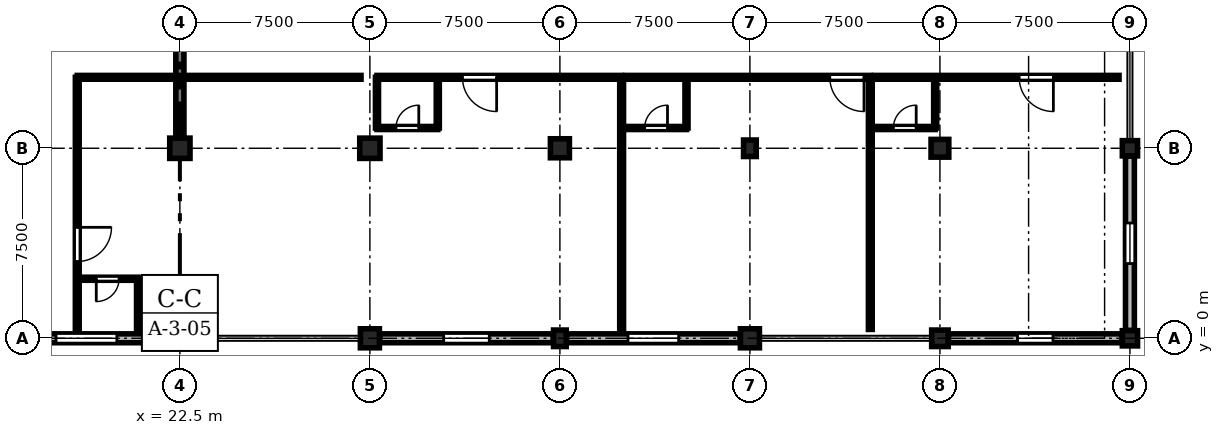
"""IFC4 building model, lengths in metres.
Left out: names, types, materials, properties, quantities, classifications, styles, units other than length and angle.
Written with IfcOpenShell. Run it as: python <this file> out.ifc"""

import sys

from ifc_helpers import new_model, si_unit, direction, frame, frame_2d, origin, origin_2d, place, context, subcontext, project, spatial, rectangle, circle, extrude, element, fill, save


model = new_model("IFC4")
c1 = context("Model", 3, precision=1e-05, world=origin(), true_north=direction((0.0, 1.0)))
c2 = subcontext(c1, "Body", "Model", "MODEL_VIEW")
j1 = project(units=[si_unit("LENGTHUNIT", "METRE"), si_unit("PLANEANGLEUNIT", "RADIAN")], contexts=[c1])
p1 = place(None, origin())
s1 = spatial("IfcSite", under=j1, at=p1, CompositionType="ELEMENT")
p2 = place(p1, origin())
s2 = spatial("IfcBuilding", under=s1, at=p2, CompositionType="ELEMENT")
p3 = place(p2, frame((0.0, 0.0, 9.3)))
s3 = spatial("IfcBuildingStorey", under=s2, at=p3, CompositionType="ELEMENT", Elevation=9.3)
p4 = place(p3, frame((22.5, 0.0, 0.0), z_axis=(0.0, 0.0, 1.0), x_axis=(1.0, 0.0, 0.0)))
e1 = element("IfcColumn", 1, at=p4, inside=s3, PredefinedType="COLUMN", context=c2, shape_type="SweptSolid", body=[
    extrude(rectangle(XDim=0.5, YDim=0.65, at=origin_2d()), origin(), (0.0, 0.0, 1.0), 4.8),
])
p5 = place(p3, frame((22.5, 7.5, 0.0), z_axis=(0.0, 0.0, 1.0), x_axis=(1.0, 0.0, 0.0)))
e2 = element("IfcColumn", 2, at=p5, inside=s3, PredefinedType="COLUMN", context=c2, shape_type="SweptSolid", body=[
    extrude(rectangle(XDim=0.8, YDim=0.8, at=origin_2d()), origin(), (0.0, 0.0, 1.0), 4.8),
])
p6 = place(p3, frame((30.0, 0.0, 0.0), z_axis=(0.0, 0.0, 1.0), x_axis=(1.0, 0.0, 0.0)))
e3 = element("IfcColumn", 3, at=p6, inside=s3, PredefinedType="COLUMN", context=c2, shape_type="SweptSolid", body=[
    extrude(rectangle(XDim=0.75, YDim=0.75, at=origin_2d()), origin(), (0.0, 0.0, 1.0), 4.8),
])
p7 = place(p3, frame((30.0, 7.5, 0.0), z_axis=(0.0, 0.0, 1.0), x_axis=(1.0, 0.0, 0.0)))
e4 = element("IfcColumn", 4, at=p7, inside=s3, PredefinedType="COLUMN", context=c2, shape_type="SweptSolid", body=[
    extrude(rectangle(XDim=0.8, YDim=0.8, at=origin_2d()), origin(), (0.0, 0.0, 1.0), 4.8),
])
p8 = place(p3, frame((37.5, 0.0, 0.0), z_axis=(0.0, 0.0, 1.0), x_axis=(1.0, 0.0, 0.0)))
e5 = element("IfcColumn", 5, at=p8, inside=s3, PredefinedType="COLUMN", context=c2, shape_type="SweptSolid", body=[
    extrude(rectangle(XDim=0.5, YDim=0.65, at=origin_2d()), origin(), (0.0, 0.0, 1.0), 4.8),
])
for number, where, z_axis, x_axis in (
    (6, (37.5, 7.5, 0.0), (0.0, 0.0, 1.0), (1.0, 0.0, 0.0)),
    (7, (45.0, 0.0, 0.0), (0.0, 0.0, 1.0), (1.0, 0.0, 0.0)),
):
    element("IfcColumn", number, at=place(p3, frame(where, z_axis=z_axis, x_axis=x_axis)), inside=s3, PredefinedType="COLUMN", context=c2, shape_type="SweptSolid", body=[
        extrude(rectangle(XDim=0.75, YDim=0.75, at=origin_2d()), origin(), (0.0, 0.0, 1.0), 4.8),
    ])
p9 = place(p3, frame((45.0, 7.5, 0.0), z_axis=(0.0, 0.0, 1.0), x_axis=(1.0, 0.0, 0.0)))
e8 = element("IfcColumn", 8, at=p9, inside=s3, PredefinedType="COLUMN", context=c2, shape_type="SweptSolid", body=[
    extrude(rectangle(XDim=0.5, YDim=0.65, at=origin_2d()), origin(), (0.0, 0.0, 1.0), 4.8),
])
p10 = place(p3, frame((52.5, 0.0, 0.0), z_axis=(0.0, 0.0, 1.0), x_axis=(1.0, 0.0, 0.0)))
e9 = element("IfcColumn", 9, at=p10, inside=s3, PredefinedType="COLUMN", context=c2, shape_type="SweptSolid", body=[
    extrude(rectangle(XDim=0.65, YDim=0.65, at=origin_2d()), origin(), (0.0, 0.0, 1.0), 4.8),
])
p11 = place(p3, frame((52.5, 7.5, 0.0), z_axis=(0.0, 0.0, 1.0), x_axis=(1.0, 0.0, 0.0)))
e10 = element("IfcColumn", 10, at=p11, inside=s3, PredefinedType="COLUMN", context=c2, shape_type="SweptSolid", body=[
    extrude(rectangle(XDim=0.7, YDim=0.7, at=origin_2d()), origin(), (0.0, 0.0, 1.0), 4.8),
])
p12 = place(p3, frame((60.0, 0.0, 0.0), z_axis=(0.0, 0.0, 1.0), x_axis=(1.0, 0.0, 0.0)))
e11 = element("IfcColumn", 11, at=p12, inside=s3, PredefinedType="COLUMN", context=c2, shape_type="SweptSolid", body=[
    extrude(rectangle(XDim=0.6, YDim=0.6, at=origin_2d()), origin(), (0.0, 0.0, 1.0), 4.8),
])
p13 = place(p3, frame((60.0, 7.5, 0.0), z_axis=(0.0, 0.0, 1.0), x_axis=(1.0, 0.0, 0.0)))
e12 = element("IfcColumn", 12, at=p13, inside=s3, PredefinedType="COLUMN", context=c2, shape_type="SweptSolid", body=[
    extrude(circle(Radius=0.3, at=origin_2d()), origin(), (0.0, 0.0, 1.0), 4.8),
])
p14 = place(p3, frame((22.5, 7.95, 0.0), z_axis=(0.0, 0.0, 1.0), x_axis=(0.0, 1.0, 0.0)))
e13 = element("IfcWall", 13, at=p14, inside=s3, PredefinedType="SHEAR", context=c2, shape_type="SweptSolid", body=[
    extrude(rectangle(XDim=6.6, YDim=0.32, at=frame_2d((3.3, 0.0))), origin(), (0.0, 0.0, 1.0), 4.0),
])
p15 = place(p3, frame((22.24, 0.0, 0.0), z_axis=(0.0, 0.0, 1.0), x_axis=(-1.0, 0.0, 0.0)))
e14 = element("IfcWall", 14, at=p15, inside=s3, PredefinedType="STANDARD", context=c2, shape_type="SweptSolid", body=[
    extrude(rectangle(XDim=6.855, YDim=0.35, at=frame_2d((3.427, 0.0))), origin(), (0.0, 0.0, 1.0), 3.95),
])
p16 = place(p15, frame((2.228, 0.0, 0.9)))
e15 = element("IfcOpeningElement", 15, at=p16, cuts=e14, PredefinedType="OPENING", context=c2, shape_type="SweptSolid", body=[
    extrude(rectangle(XDim=2.4, YDim=2.1, at=frame_2d((1.2, 1.05))), frame((0.0, 0.185, 0.0), z_axis=(0.0, -1.0, 0.0), x_axis=(1.0, 0.0, 0.0)), (0.0, 0.0, 1.0), 0.37),
])
p17 = place(p3, frame((37.24, 0.0, 0.0), z_axis=(0.0, 0.0, 1.0), x_axis=(-1.0, 0.0, 0.0)))
e16 = element("IfcWall", 16, at=p17, inside=s3, PredefinedType="STANDARD", context=c2, shape_type="SweptSolid", body=[
    extrude(rectangle(XDim=6.855, YDim=0.35, at=frame_2d((3.427, 0.0))), origin(), (0.0, 0.0, 1.0), 3.95),
])
p18 = place(p17, frame((2.528, 0.0, 0.9)))
e17 = element("IfcOpeningElement", 17, at=p18, cuts=e16, PredefinedType="OPENING", context=c2, shape_type="SweptSolid", body=[
    extrude(rectangle(XDim=1.8, YDim=1.95, at=frame_2d((0.9, 0.975))), frame((0.0, 0.185, 0.0), z_axis=(0.0, -1.0, 0.0), x_axis=(1.0, 0.0, 0.0)), (0.0, 0.0, 1.0), 0.37),
])
p19 = place(p3, frame((44.615, 0.0, 0.0), z_axis=(0.0, 0.0, 1.0), x_axis=(-1.0, 0.0, 0.0)))
e18 = element("IfcWall", 18, at=p19, inside=s3, PredefinedType="STANDARD", context=c2, shape_type="SweptSolid", body=[
    extrude(rectangle(XDim=6.855, YDim=0.35, at=frame_2d((3.427, 0.0))), origin(), (0.0, 0.0, 1.0), 3.95),
])
p20 = place(p19, frame((2.427, 0.0, 0.9)))
e19 = element("IfcOpeningElement", 19, at=p20, cuts=e18, PredefinedType="OPENING", context=c2, shape_type="SweptSolid", body=[
    extrude(rectangle(XDim=2.0, YDim=1.95, at=frame_2d((1.0, 0.975))), frame((0.0, 0.185, 0.0), z_axis=(0.0, -1.0, 0.0), x_axis=(1.0, 0.0, 0.0)), (0.0, 0.0, 1.0), 0.37),
])
p21 = place(p3, frame((59.69, 0.0, 0.0), z_axis=(0.0, 0.0, 1.0), x_axis=(-1.0, 0.0, 0.0)))
e20 = element("IfcWall", 20, at=p21, inside=s3, PredefinedType="STANDARD", context=c2, shape_type="SweptSolid", body=[
    extrude(rectangle(XDim=6.855, YDim=0.35, at=frame_2d((3.427, 0.0))), origin(), (0.0, 0.0, 1.0), 3.95),
])
p22 = place(p21, frame((2.728, 0.0, 0.9)))
e21 = element("IfcOpeningElement", 21, at=p22, cuts=e20, PredefinedType="OPENING", context=c2, shape_type="SweptSolid", body=[
    extrude(rectangle(XDim=1.4, YDim=1.8, at=frame_2d((0.7, 0.9))), frame((0.0, 0.185, 0.0), z_axis=(0.0, -1.0, 0.0), x_axis=(1.0, 0.0, 0.0)), (0.0, 0.0, 1.0), 0.37),
])
p23 = place(p3, frame((60.0, 7.19, 0.0), z_axis=(0.0, 0.0, 1.0), x_axis=(0.0, -1.0, 0.0)))
e22 = element("IfcWall", 22, at=p23, inside=s3, PredefinedType="STANDARD", context=c2, shape_type="SweptSolid", body=[
    extrude(rectangle(XDim=6.88, YDim=0.35, at=frame_2d((3.44, 0.0))), origin(), (0.0, 0.0, 1.0), 3.95),
])
p24 = place(p23, frame((2.64, 0.0, 0.9)))
e23 = element("IfcOpeningElement", 23, at=p24, cuts=e22, PredefinedType="OPENING", context=c2, shape_type="SweptSolid", body=[
    extrude(rectangle(XDim=1.6, YDim=1.8, at=frame_2d((0.8, 0.9))), frame((0.0, 0.185, 0.0), z_axis=(0.0, -1.0, 0.0), x_axis=(1.0, 0.0, 0.0)), (0.0, 0.0, 1.0), 0.37),
])
p25 = place(p3, frame((18.45, 10.3, 0.0), z_axis=(0.0, 0.0, 1.0), x_axis=(0.0, -1.0, 0.0)))
e24 = element("IfcWall", 24, at=p25, inside=s3, PredefinedType="PARTITIONING", context=c2, shape_type="SweptSolid", body=[
    extrude(rectangle(XDim=9.95, YDim=0.15, at=frame_2d((4.975, 0.0))), origin(), (0.0, 0.0, 1.0), 4.535),
])
p26 = place(p25, frame((5.92, 0.0, 0.0)))
e25 = element("IfcOpeningElement", 25, at=p26, cuts=e24, PredefinedType="OPENING", context=c2, shape_type="SweptSolid", body=[
    extrude(rectangle(XDim=1.35, YDim=2.25, at=frame_2d((0.675, 1.125))), frame((0.0, 0.085, 0.0), z_axis=(0.0, -1.0, 0.0), x_axis=(1.0, 0.0, 0.0)), (0.0, 0.0, 1.0), 0.17),
])
p27 = place(p3, frame((20.85, 2.35, 0.0), z_axis=(0.0, 0.0, 1.0), x_axis=(-1.0, 0.0, 0.0)))
e26 = element("IfcWall", 26, at=p27, inside=s3, PredefinedType="PARTITIONING", context=c2, shape_type="SweptSolid", body=[
    extrude(rectangle(XDim=2.4, YDim=0.12, at=frame_2d((1.2, 0.0))), origin(), (0.0, 0.0, 1.0), 4.535),
])
p28 = place(p27, frame((0.75, 0.0, 0.0)))
e27 = element("IfcOpeningElement", 27, at=p28, cuts=e26, PredefinedType="OPENING", context=c2, shape_type="SweptSolid", body=[
    extrude(rectangle(XDim=0.9, YDim=2.1, at=frame_2d((0.45, 1.05))), frame((0.0, 0.07, 0.0), z_axis=(0.0, -1.0, 0.0), x_axis=(1.0, 0.0, 0.0)), (0.0, 0.0, 1.0), 0.14),
])
p29 = place(p3, frame((20.85, 0.35, 0.0), z_axis=(0.0, 0.0, 1.0), x_axis=(0.0, 1.0, 0.0)))
e28 = element("IfcWall", 28, at=p29, inside=s3, PredefinedType="PARTITIONING", context=c2, shape_type="SweptSolid", body=[
    extrude(rectangle(XDim=2.0, YDim=0.12, at=frame_2d((1.0, 0.0))), origin(), (0.0, 0.0, 1.0), 4.535),
])
p30 = place(p3, frame((39.937, 10.3, 0.0), z_axis=(0.0, 0.0, 1.0), x_axis=(-1.0, 0.0, 0.0)))
e29 = element("IfcWall", 29, at=p30, inside=s3, PredefinedType="PARTITIONING", context=c2, shape_type="SweptSolid", body=[
    extrude(rectangle(XDim=9.657, YDim=0.15, at=frame_2d((4.828, 0.0))), origin(), (0.0, 0.0, 1.0), 4.535),
])
p31 = place(p30, frame((4.934, 0.0, 0.0)))
e30 = element("IfcOpeningElement", 30, at=p31, cuts=e29, PredefinedType="OPENING", context=c2, shape_type="SweptSolid", body=[
    extrude(rectangle(XDim=1.35, YDim=2.25, at=frame_2d((0.675, 1.125))), frame((0.0, 0.085, 0.0), z_axis=(0.0, -1.0, 0.0), x_axis=(1.0, 0.0, 0.0)), (0.0, 0.0, 1.0), 0.17),
])
p32 = place(p3, frame((30.28, 8.3, 0.0), z_axis=(0.0, 0.0, 1.0), x_axis=(1.0, 0.0, 0.0)))
e31 = element("IfcWall", 31, at=p32, inside=s3, PredefinedType="PARTITIONING", context=c2, shape_type="SweptSolid", body=[
    extrude(rectangle(XDim=2.4, YDim=0.12, at=frame_2d((1.2, 0.0))), origin(), (0.0, 0.0, 1.0), 4.535),
])
p33 = place(p32, frame((0.75, 0.0, 0.0)))
e32 = element("IfcOpeningElement", 32, at=p33, cuts=e31, PredefinedType="OPENING", context=c2, shape_type="SweptSolid", body=[
    extrude(rectangle(XDim=0.9, YDim=2.1, at=frame_2d((0.45, 1.05))), frame((0.0, 0.07, 0.0), z_axis=(0.0, -1.0, 0.0), x_axis=(1.0, 0.0, 0.0)), (0.0, 0.0, 1.0), 0.14),
])
p34 = place(p3, frame((32.68, 8.3, 0.0), z_axis=(0.0, 0.0, 1.0), x_axis=(0.0, 1.0, 0.0)))
e33 = element("IfcWall", 33, at=p34, inside=s3, PredefinedType="PARTITIONING", context=c2, shape_type="SweptSolid", body=[
    extrude(rectangle(XDim=2.0, YDim=0.12, at=frame_2d((1.0, 0.0))), origin(), (0.0, 0.0, 1.0), 4.535),
])
p35 = place(p3, frame((49.753, 10.3, 0.0), z_axis=(0.0, 0.0, 1.0), x_axis=(-1.0, 0.0, 0.0)))
e34 = element("IfcWall", 34, at=p35, inside=s3, PredefinedType="PARTITIONING", context=c2, shape_type="SweptSolid", body=[
    extrude(rectangle(XDim=9.657, YDim=0.15, at=frame_2d((4.828, 0.0))), origin(), (0.0, 0.0, 1.0), 4.535),
])
p36 = place(p35, frame((0.25, 0.0, 0.0)))
e35 = element("IfcOpeningElement", 35, at=p36, cuts=e34, PredefinedType="OPENING", context=c2, shape_type="SweptSolid", body=[
    extrude(rectangle(XDim=1.35, YDim=2.25, at=frame_2d((0.675, 1.125))), frame((0.0, 0.085, 0.0), z_axis=(0.0, -1.0, 0.0), x_axis=(1.0, 0.0, 0.0)), (0.0, 0.0, 1.0), 0.17),
])
p37 = place(p3, frame((40.097, 8.3, 0.0), z_axis=(0.0, 0.0, 1.0), x_axis=(1.0, 0.0, 0.0)))
e36 = element("IfcWall", 36, at=p37, inside=s3, PredefinedType="PARTITIONING", context=c2, shape_type="SweptSolid", body=[
    extrude(rectangle(XDim=2.4, YDim=0.12, at=frame_2d((1.2, 0.0))), origin(), (0.0, 0.0, 1.0), 4.535),
])
p38 = place(p37, frame((0.75, 0.0, 0.0)))
e37 = element("IfcOpeningElement", 37, at=p38, cuts=e36, PredefinedType="OPENING", context=c2, shape_type="SweptSolid", body=[
    extrude(rectangle(XDim=0.9, YDim=2.1, at=frame_2d((0.45, 1.05))), frame((0.0, 0.07, 0.0), z_axis=(0.0, -1.0, 0.0), x_axis=(1.0, 0.0, 0.0)), (0.0, 0.0, 1.0), 0.14),
])
p39 = place(p3, frame((42.497, 8.3, 0.0), z_axis=(0.0, 0.0, 1.0), x_axis=(0.0, 1.0, 0.0)))
e38 = element("IfcWall", 38, at=p39, inside=s3, PredefinedType="PARTITIONING", context=c2, shape_type="SweptSolid", body=[
    extrude(rectangle(XDim=2.0, YDim=0.12, at=frame_2d((1.0, 0.0))), origin(), (0.0, 0.0, 1.0), 4.535),
])
p40 = place(p3, frame((59.57, 10.3, 0.0), z_axis=(0.0, 0.0, 1.0), x_axis=(-1.0, 0.0, 0.0)))
e39 = element("IfcWall", 39, at=p40, inside=s3, PredefinedType="PARTITIONING", context=c2, shape_type="SweptSolid", body=[
    extrude(rectangle(XDim=9.657, YDim=0.15, at=frame_2d((4.828, 0.0))), origin(), (0.0, 0.0, 1.0), 4.535),
])
p41 = place(p40, frame((2.592, 0.0, 0.0)))
e40 = element("IfcOpeningElement", 40, at=p41, cuts=e39, PredefinedType="OPENING", context=c2, shape_type="SweptSolid", body=[
    extrude(rectangle(XDim=1.35, YDim=2.25, at=frame_2d((0.675, 1.125))), frame((0.0, 0.085, 0.0), z_axis=(0.0, -1.0, 0.0), x_axis=(1.0, 0.0, 0.0)), (0.0, 0.0, 1.0), 0.17),
])
p42 = place(p3, frame((49.913, 8.3, 0.0), z_axis=(0.0, 0.0, 1.0), x_axis=(1.0, 0.0, 0.0)))
e41 = element("IfcWall", 41, at=p42, inside=s3, PredefinedType="PARTITIONING", context=c2, shape_type="SweptSolid", body=[
    extrude(rectangle(XDim=2.4, YDim=0.12, at=frame_2d((1.2, 0.0))), origin(), (0.0, 0.0, 1.0), 4.535),
])
p43 = place(p42, frame((0.75, 0.0, 0.0)))
e42 = element("IfcOpeningElement", 42, at=p43, cuts=e41, PredefinedType="OPENING", context=c2, shape_type="SweptSolid", body=[
    extrude(rectangle(XDim=0.9, YDim=2.1, at=frame_2d((0.45, 1.05))), frame((0.0, 0.07, 0.0), z_axis=(0.0, -1.0, 0.0), x_axis=(1.0, 0.0, 0.0)), (0.0, 0.0, 1.0), 0.14),
])
p44 = place(p3, frame((52.313, 8.3, 0.0), z_axis=(0.0, 0.0, 1.0), x_axis=(0.0, 1.0, 0.0)))
e43 = element("IfcWall", 43, at=p44, inside=s3, PredefinedType="PARTITIONING", context=c2, shape_type="SweptSolid", body=[
    extrude(rectangle(XDim=2.0, YDim=0.12, at=frame_2d((1.0, 0.0))), origin(), (0.0, 0.0, 1.0), 3.985),
])
p45 = place(p3, frame((18.45, 10.3, 0.0), z_axis=(0.0, 0.0, 1.0), x_axis=(1.0, 0.0, 0.0)))
e44 = element("IfcWall", 44, at=p45, inside=s3, PredefinedType="PARTITIONING", context=c2, shape_type="SweptSolid", body=[
    extrude(rectangle(XDim=11.2, YDim=0.15, at=frame_2d((5.6, 0.0))), origin(), (0.0, 0.0, 1.0), 4.535),
])
for number, where, z_axis, x_axis in (
    (45, (39.937, 0.35, 0.0), (0.0, 0.0, 1.0), (0.0, 1.0, 0.0)),
    (46, (49.753, 0.35, 0.0), (0.0, 0.0, 1.0), (0.0, 1.0, 0.0)),
):
    element("IfcWall", number, at=place(p3, frame(where, z_axis=z_axis, x_axis=x_axis)), inside=s3, PredefinedType="PARTITIONING", context=c2, shape_type="SweptSolid", body=[
        extrude(rectangle(XDim=9.95, YDim=0.15, at=frame_2d((4.975, 0.0))), origin(), (0.0, 0.0, 1.0), 4.535),
    ])
p46 = place(p3, frame((30.28, 8.3, 0.0), z_axis=(0.0, 0.0, 1.0), x_axis=(0.0, 1.0, 0.0)))
e47 = element("IfcWall", 47, at=p46, inside=s3, PredefinedType="PARTITIONING", context=c2, shape_type="SweptSolid", body=[
    extrude(rectangle(XDim=2.0, YDim=0.12, at=frame_2d((1.0, 0.0))), origin(), (0.0, 0.0, 1.0), 4.035),
])
p47 = place(p16, origin())
e48 = element("IfcWindow", 48, at=p47, inside=s3, PartitioningType="SINGLE_PANEL", PredefinedType="WINDOW", context=c2, shape_type="SweptSolid", body=[
    extrude(rectangle(XDim=2.4, YDim=2.1, at=frame_2d((1.2, 1.05))), frame((0.0, 0.03, 0.0), z_axis=(0.0, -1.0, 0.0), x_axis=(1.0, 0.0, 0.0)), (0.0, 0.0, 1.0), 0.06),
])
fill(e15, e48)
p48 = place(p18, origin())
e49 = element("IfcWindow", 49, at=p48, inside=s3, PartitioningType="SINGLE_PANEL", PredefinedType="WINDOW", context=c2, shape_type="SweptSolid", body=[
    extrude(rectangle(XDim=1.8, YDim=1.95, at=frame_2d((0.9, 0.975))), frame((0.0, 0.03, 0.0), z_axis=(0.0, -1.0, 0.0), x_axis=(1.0, 0.0, 0.0)), (0.0, 0.0, 1.0), 0.06),
])
fill(e17, e49)
p49 = place(p20, origin())
e50 = element("IfcWindow", 50, at=p49, inside=s3, PartitioningType="SINGLE_PANEL", PredefinedType="WINDOW", context=c2, shape_type="SweptSolid", body=[
    extrude(rectangle(XDim=2.0, YDim=1.95, at=frame_2d((1.0, 0.975))), frame((0.0, 0.03, 0.0), z_axis=(0.0, -1.0, 0.0), x_axis=(1.0, 0.0, 0.0)), (0.0, 0.0, 1.0), 0.06),
])
fill(e19, e50)
p50 = place(p22, origin())
e51 = element("IfcWindow", 51, at=p50, inside=s3, PartitioningType="SINGLE_PANEL", PredefinedType="WINDOW", context=c2, shape_type="SweptSolid", body=[
    extrude(rectangle(XDim=1.4, YDim=1.8, at=frame_2d((0.7, 0.9))), frame((0.0, 0.03, 0.0), z_axis=(0.0, -1.0, 0.0), x_axis=(1.0, 0.0, 0.0)), (0.0, 0.0, 1.0), 0.06),
])
fill(e21, e51)
p51 = place(p24, origin())
e52 = element("IfcWindow", 52, at=p51, inside=s3, PartitioningType="SINGLE_PANEL", PredefinedType="WINDOW", context=c2, shape_type="SweptSolid", body=[
    extrude(rectangle(XDim=1.6, YDim=1.8, at=frame_2d((0.8, 0.9))), frame((0.0, 0.03, 0.0), z_axis=(0.0, -1.0, 0.0), x_axis=(1.0, 0.0, 0.0)), (0.0, 0.0, 1.0), 0.06),
])
fill(e23, e52)
p52 = place(p26, origin())
e53 = element("IfcDoor", 53, at=p52, inside=s3, OperationType="SINGLE_SWING_LEFT", PredefinedType="DOOR", context=c2, shape_type="SweptSolid", body=[
    extrude(rectangle(XDim=1.35, YDim=2.25, at=frame_2d((0.675, 1.125))), frame((0.0, 0.025, 0.0), z_axis=(0.0, -1.0, 0.0), x_axis=(1.0, 0.0, 0.0)), (0.0, 0.0, 1.0), 0.05),
])
fill(e25, e53)
p53 = place(p28, origin())
e54 = element("IfcDoor", 54, at=p53, inside=s3, OperationType="SINGLE_SWING_RIGHT", PredefinedType="DOOR", context=c2, shape_type="SweptSolid", body=[
    extrude(rectangle(XDim=0.9, YDim=2.1, at=frame_2d((0.45, 1.05))), frame((0.0, 0.025, 0.0), z_axis=(0.0, -1.0, 0.0), x_axis=(1.0, 0.0, 0.0)), (0.0, 0.0, 1.0), 0.05),
])
fill(e27, e54)
p54 = place(p31, origin())
e55 = element("IfcDoor", 55, at=p54, inside=s3, OperationType="SINGLE_SWING_LEFT", PredefinedType="DOOR", context=c2, shape_type="SweptSolid", body=[
    extrude(rectangle(XDim=1.35, YDim=2.25, at=frame_2d((0.675, 1.125))), frame((0.0, 0.025, 0.0), z_axis=(0.0, -1.0, 0.0), x_axis=(1.0, 0.0, 0.0)), (0.0, 0.0, 1.0), 0.05),
])
fill(e30, e55)
p55 = place(p33, origin())
e56 = element("IfcDoor", 56, at=p55, inside=s3, OperationType="SINGLE_SWING_RIGHT", PredefinedType="DOOR", context=c2, shape_type="SweptSolid", body=[
    extrude(rectangle(XDim=0.9, YDim=2.1, at=frame_2d((0.45, 1.05))), frame((0.0, 0.025, 0.0), z_axis=(0.0, -1.0, 0.0), x_axis=(1.0, 0.0, 0.0)), (0.0, 0.0, 1.0), 0.05),
])
fill(e32, e56)
p56 = place(p36, origin())
e57 = element("IfcDoor", 57, at=p56, inside=s3, OperationType="SINGLE_SWING_LEFT", PredefinedType="DOOR", context=c2, shape_type="SweptSolid", body=[
    extrude(rectangle(XDim=1.35, YDim=2.25, at=frame_2d((0.675, 1.125))), frame((0.0, 0.025, 0.0), z_axis=(0.0, -1.0, 0.0), x_axis=(1.0, 0.0, 0.0)), (0.0, 0.0, 1.0), 0.05),
])
fill(e35, e57)
p57 = place(p38, origin())
e58 = element("IfcDoor", 58, at=p57, inside=s3, OperationType="SINGLE_SWING_RIGHT", PredefinedType="DOOR", context=c2, shape_type="SweptSolid", body=[
    extrude(rectangle(XDim=0.9, YDim=2.1, at=frame_2d((0.45, 1.05))), frame((0.0, 0.025, 0.0), z_axis=(0.0, -1.0, 0.0), x_axis=(1.0, 0.0, 0.0)), (0.0, 0.0, 1.0), 0.05),
])
fill(e37, e58)
p58 = place(p41, origin())
e59 = element("IfcDoor", 59, at=p58, inside=s3, OperationType="SINGLE_SWING_LEFT", PredefinedType="DOOR", context=c2, shape_type="SweptSolid", body=[
    extrude(rectangle(XDim=1.35, YDim=2.25, at=frame_2d((0.675, 1.125))), frame((0.0, 0.025, 0.0), z_axis=(0.0, -1.0, 0.0), x_axis=(1.0, 0.0, 0.0)), (0.0, 0.0, 1.0), 0.05),
])
fill(e40, e59)
p59 = place(p43, origin())
e60 = element("IfcDoor", 60, at=p59, inside=s3, OperationType="SINGLE_SWING_RIGHT", PredefinedType="DOOR", context=c2, shape_type="SweptSolid", body=[
    extrude(rectangle(XDim=0.9, YDim=2.1, at=frame_2d((0.45, 1.05))), frame((0.0, 0.025, 0.0), z_axis=(0.0, -1.0, 0.0), x_axis=(1.0, 0.0, 0.0)), (0.0, 0.0, 1.0), 0.05),
])
fill(e42, e60)
save(model, sys.argv[1])
